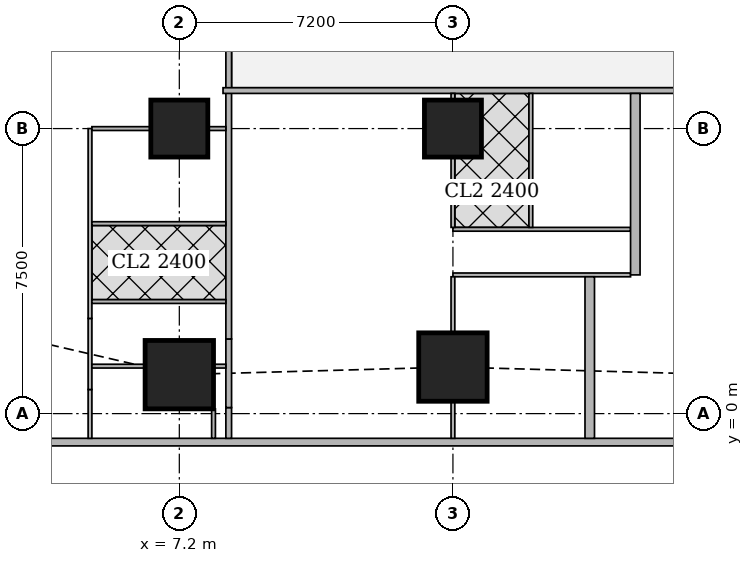
"""IFC4 building model, lengths in metres.
Left out: names, types, materials, properties, quantities, classifications, styles, units other than length and angle.
Written with IfcOpenShell. Run it as: python <this file> out.ifc"""

import sys

from ifc_helpers import new_model, si_unit, direction, frame, frame_2d, origin, origin_2d, place, context, subcontext, project, spatial, rectangle, extrude, element, fill, save


model = new_model("IFC4")
c1 = context("Model", 3, precision=1e-05, world=origin(), true_north=direction((0.0, 1.0)))
c2 = subcontext(c1, "Body", "Model", "MODEL_VIEW")
j1 = project(units=[si_unit("LENGTHUNIT", "METRE"), si_unit("PLANEANGLEUNIT", "RADIAN")], contexts=[c1])
p1 = place(None, origin())
s1 = spatial("IfcSite", under=j1, at=p1, CompositionType="ELEMENT")
p2 = place(p1, origin())
s2 = spatial("IfcBuilding", under=s1, at=p2, CompositionType="ELEMENT")
p3 = place(p2, frame((0.0, 0.0, 158.3)))
s3 = spatial("IfcBuildingStorey", under=s2, at=p3, CompositionType="ELEMENT", Elevation=158.3)
for number, where, z_axis, x_axis in (
    (1, (7.2, 1.025, 0.0), (0.0, 0.0, 1.0), (1.0, 0.0, 0.0)),
    (2, (14.4, 1.225, 0.0), (0.0, 0.0, 1.0), (1.0, 0.0, 0.0)),
):
    element("IfcColumn", number, at=place(p3, frame(where, z_axis=z_axis, x_axis=x_axis)), inside=s3, PredefinedType="COLUMN", context=c2, shape_type="SweptSolid", body=[
        extrude(rectangle(XDim=1.8, YDim=1.8, at=origin_2d()), origin(), (0.0, 0.0, 1.0), 3.75),
    ])
for number, where, z_axis, x_axis in (
    (3, (7.2, 7.5, 0.0), (0.0, 0.0, 1.0), (1.0, 0.0, 0.0)),
    (4, (14.4, 7.5, 0.0), (0.0, 0.0, 1.0), (1.0, 0.0, 0.0)),
):
    element("IfcColumn", number, at=place(p3, frame(where, z_axis=z_axis, x_axis=x_axis)), inside=s3, PredefinedType="COLUMN", context=c2, shape_type="SweptSolid", body=[
        extrude(rectangle(XDim=1.5, YDim=1.5, at=origin_2d()), origin(), (0.0, 0.0, 1.0), 3.75),
    ])
p4 = place(p3, frame((2.163, -0.75, 0.0), z_axis=(0.0, 0.0, 1.0), x_axis=(1.0, 0.0, 0.0)))
e5 = element("IfcWall", 5, at=p4, inside=s3, PredefinedType="SOLIDWALL", context=c2, shape_type="SweptSolid", body=[
    extrude(rectangle(XDim=45.628, YDim=0.2, at=frame_2d((22.814, 0.0))), origin(), (0.0, 0.0, 1.0), 3.5),
])
p5 = place(p4, frame((9.537, 0.0, 0.9)))
e6 = element("IfcOpeningElement", 6, at=p5, cuts=e5, PredefinedType="OPENING", context=c2, shape_type="SweptSolid", body=[
    extrude(rectangle(XDim=1.8, YDim=1.5, at=frame_2d((0.9, 0.75))), frame((0.0, 0.11, 0.0), z_axis=(0.0, -1.0, 0.0), x_axis=(1.0, 0.0, 0.0)), (0.0, 0.0, 1.0), 0.22),
])
p6 = place(p4, frame((13.137, 0.0, 0.9)))
e7 = element("IfcOpeningElement", 7, at=p6, cuts=e5, PredefinedType="OPENING", context=c2, shape_type="SweptSolid", body=[
    extrude(rectangle(XDim=1.8, YDim=1.5, at=frame_2d((0.9, 0.75))), frame((0.0, 0.11, 0.0), z_axis=(0.0, -1.0, 0.0), x_axis=(1.0, 0.0, 0.0)), (0.0, 0.0, 1.0), 0.22),
])
p7 = place(p4, frame((16.737, 0.0, 0.9)))
e8 = element("IfcOpeningElement", 8, at=p7, cuts=e5, PredefinedType="OPENING", context=c2, shape_type="SweptSolid", body=[
    extrude(rectangle(XDim=1.8, YDim=1.5, at=frame_2d((0.9, 0.75))), frame((0.0, 0.11, 0.0), z_axis=(0.0, -1.0, 0.0), x_axis=(1.0, 0.0, 0.0)), (0.0, 0.0, 1.0), 0.22),
])
p8 = place(p4, frame((20.337, 0.0, 0.9)))
e9 = element("IfcOpeningElement", 9, at=p8, cuts=e5, PredefinedType="OPENING", context=c2, shape_type="SweptSolid", body=[
    extrude(rectangle(XDim=1.8, YDim=1.5, at=frame_2d((0.9, 0.75))), frame((0.0, 0.11, 0.0), z_axis=(0.0, -1.0, 0.0), x_axis=(1.0, 0.0, 0.0)), (0.0, 0.0, 1.0), 0.22),
])
p9 = place(p4, frame((23.937, 0.0, 0.9)))
e10 = element("IfcOpeningElement", 10, at=p9, cuts=e5, PredefinedType="OPENING", context=c2, shape_type="SweptSolid", body=[
    extrude(rectangle(XDim=1.8, YDim=1.5, at=frame_2d((0.9, 0.75))), frame((0.0, 0.11, 0.0), z_axis=(0.0, -1.0, 0.0), x_axis=(1.0, 0.0, 0.0)), (0.0, 0.0, 1.0), 0.22),
])
p10 = place(p4, frame((27.537, 0.0, 0.9)))
e11 = element("IfcOpeningElement", 11, at=p10, cuts=e5, PredefinedType="OPENING", context=c2, shape_type="SweptSolid", body=[
    extrude(rectangle(XDim=1.8, YDim=1.5, at=frame_2d((0.9, 0.75))), frame((0.0, 0.11, 0.0), z_axis=(0.0, -1.0, 0.0), x_axis=(1.0, 0.0, 0.0)), (0.0, 0.0, 1.0), 0.22),
])
p11 = place(p4, frame((31.137, 0.0, 0.9)))
e12 = element("IfcOpeningElement", 12, at=p11, cuts=e5, PredefinedType="OPENING", context=c2, shape_type="SweptSolid", body=[
    extrude(rectangle(XDim=1.8, YDim=1.5, at=frame_2d((0.9, 0.75))), frame((0.0, 0.11, 0.0), z_axis=(0.0, -1.0, 0.0), x_axis=(1.0, 0.0, 0.0)), (0.0, 0.0, 1.0), 0.22),
])
p12 = place(p4, frame((34.737, 0.0, 0.9)))
e13 = element("IfcOpeningElement", 13, at=p12, cuts=e5, PredefinedType="OPENING", context=c2, shape_type="SweptSolid", body=[
    extrude(rectangle(XDim=1.8, YDim=1.5, at=frame_2d((0.9, 0.75))), frame((0.0, 0.11, 0.0), z_axis=(0.0, -1.0, 0.0), x_axis=(1.0, 0.0, 0.0)), (0.0, 0.0, 1.0), 0.22),
])
p13 = place(p3, frame((8.5, -0.65, 0.0), z_axis=(0.0, 0.0, 1.0), x_axis=(0.0, 1.0, 0.0)))
e14 = element("IfcWall", 14, at=p13, inside=s3, PredefinedType="SOLIDWALL", context=c2, shape_type="SweptSolid", body=[
    extrude(rectangle(XDim=0.809, YDim=0.15, at=frame_2d((0.404, 0.0))), origin(), (0.0, 0.0, 1.0), 3.5),
])
p14 = place(p3, frame((8.5, 0.159, 0.0), z_axis=(0.0, 0.0, 1.0), x_axis=(0.0, 1.0, 0.0)))
e15 = element("IfcWall", 15, at=p14, inside=s3, PredefinedType="SOLIDWALL", context=c2, shape_type="SweptSolid", body=[
    extrude(rectangle(XDim=1.805, YDim=0.15, at=frame_2d((0.903, 0.0))), origin(), (0.0, 0.0, 1.0), 2.1),
])
p15 = place(p3, frame((8.5, 1.964, 0.0), z_axis=(0.0, 0.0, 1.0), x_axis=(0.0, 1.0, 0.0)))
e16 = element("IfcWall", 16, at=p15, inside=s3, PredefinedType="SOLIDWALL", context=c2, shape_type="SweptSolid", body=[
    extrude(rectangle(XDim=41.097, YDim=0.15, at=frame_2d((20.548, 0.0))), origin(), (0.0, 0.0, 1.0), 3.5),
])
p16 = place(p15, frame((6.911, 0.0, 0.0)))
e17 = element("IfcOpeningElement", 17, at=p16, cuts=e16, PredefinedType="OPENING", context=c2, shape_type="SweptSolid", body=[
    extrude(rectangle(XDim=1.0, YDim=2.1, at=frame_2d((0.5, 1.05))), frame((0.0, 0.085, 0.0), z_axis=(0.0, -1.0, 0.0), x_axis=(1.0, 0.0, 0.0)), (0.0, 0.0, 1.0), 0.17),
])
p17 = place(p15, frame((10.661, 0.0, 0.0)))
e18 = element("IfcOpeningElement", 18, at=p17, cuts=e16, PredefinedType="OPENING", context=c2, shape_type="SweptSolid", body=[
    extrude(rectangle(XDim=1.0, YDim=2.1, at=frame_2d((0.5, 1.05))), frame((0.0, 0.085, 0.0), z_axis=(0.0, -1.0, 0.0), x_axis=(1.0, 0.0, 0.0)), (0.0, 0.0, 1.0), 0.17),
])
p18 = place(p15, frame((25.661, 0.0, 0.0)))
e19 = element("IfcOpeningElement", 19, at=p18, cuts=e16, PredefinedType="OPENING", context=c2, shape_type="SweptSolid", body=[
    extrude(rectangle(XDim=1.0, YDim=2.1, at=frame_2d((0.5, 1.05))), frame((0.0, 0.085, 0.0), z_axis=(0.0, -1.0, 0.0), x_axis=(1.0, 0.0, 0.0)), (0.0, 0.0, 1.0), 0.17),
])
p19 = place(p3, frame((40.053, 8.5, 0.0), z_axis=(0.0, 0.0, 1.0), x_axis=(-1.0, 0.0, 0.0)))
e20 = element("IfcWall", 20, at=p19, inside=s3, PredefinedType="SOLIDWALL", context=c2, shape_type="SweptSolid", body=[
    extrude(rectangle(XDim=31.703, YDim=0.15, at=frame_2d((15.852, 0.0))), origin(), (0.0, 0.0, 1.0), 3.5),
])
p20 = place(p19, frame((28.103, 0.0, 0.0)))
e21 = element("IfcOpeningElement", 21, at=p20, cuts=e20, PredefinedType="OPENING", context=c2, shape_type="SweptSolid", body=[
    extrude(rectangle(XDim=1.0, YDim=2.1, at=frame_2d((0.5, 1.05))), frame((0.0, 0.085, 0.0), z_axis=(0.0, -1.0, 0.0), x_axis=(1.0, 0.0, 0.0)), (0.0, 0.0, 1.0), 0.17),
])
p21 = place(p19, frame((19.754, 0.0, 0.0)))
e22 = element("IfcOpeningElement", 22, at=p21, cuts=e20, PredefinedType="OPENING", context=c2, shape_type="SweptSolid", body=[
    extrude(rectangle(XDim=1.0, YDim=2.1, at=frame_2d((0.5, 1.05))), frame((0.0, 0.085, 0.0), z_axis=(0.0, -1.0, 0.0), x_axis=(1.0, 0.0, 0.0)), (0.0, 0.0, 1.0), 0.17),
])
p22 = place(p19, frame((5.354, 0.0, 0.0)))
e23 = element("IfcOpeningElement", 23, at=p22, cuts=e20, PredefinedType="OPENING", context=c2, shape_type="SweptSolid", body=[
    extrude(rectangle(XDim=1.0, YDim=2.1, at=frame_2d((0.5, 1.05))), frame((0.0, 0.085, 0.0), z_axis=(0.0, -1.0, 0.0), x_axis=(1.0, 0.0, 0.0)), (0.0, 0.0, 1.0), 0.17),
])
p23 = place(p3, frame((8.1, 0.124, 0.0), z_axis=(0.0, 0.0, 1.0), x_axis=(0.0, -1.0, 0.0)))
e24 = element("IfcWall", 24, at=p23, inside=s3, PredefinedType="PARTITIONING", context=c2, shape_type="SweptSolid", body=[
    extrude(rectangle(XDim=0.774, YDim=0.1, at=frame_2d((0.387, 0.0))), origin(), (0.0, 0.0, 1.0), 3.5),
])
p24 = place(p3, frame((4.85, -0.65, 0.0), z_axis=(0.0, 0.0, 1.0), x_axis=(0.0, 1.0, 0.0)))
e25 = element("IfcWall", 25, at=p24, inside=s3, PredefinedType="PARTITIONING", context=c2, shape_type="SweptSolid", body=[
    extrude(rectangle(XDim=1.284, YDim=0.1, at=frame_2d((0.642, 0.0))), origin(), (0.0, 0.0, 1.0), 3.5),
])
p25 = place(p24, frame((0.234, 0.0, 0.0)))
e26 = element("IfcOpeningElement", 26, at=p25, cuts=e25, PredefinedType="OPENING", context=c2, shape_type="SweptSolid", body=[
    extrude(rectangle(XDim=0.9, YDim=2.1, at=frame_2d((0.45, 1.05))), frame((0.0, 0.06, 0.0), z_axis=(0.0, -1.0, 0.0), x_axis=(1.0, 0.0, 0.0)), (0.0, 0.0, 1.0), 0.12),
])
p26 = place(p3, frame((4.85, 0.634, 0.0), z_axis=(0.0, 0.0, 1.0), x_axis=(0.0, 1.0, 0.0)))
e27 = element("IfcWall", 27, at=p26, inside=s3, PredefinedType="PARTITIONING", context=c2, shape_type="SweptSolid", body=[
    extrude(rectangle(XDim=1.871, YDim=0.1, at=frame_2d((0.936, 0.0))), origin(), (0.0, 0.0, 1.0), 2.1),
])
p27 = place(p3, frame((4.85, 2.505, 0.0), z_axis=(0.0, 0.0, 1.0), x_axis=(0.0, 1.0, 0.0)))
e28 = element("IfcWall", 28, at=p27, inside=s3, PredefinedType="PARTITIONING", context=c2, shape_type="SweptSolid", body=[
    extrude(rectangle(XDim=4.995, YDim=0.1, at=frame_2d((2.498, 0.0))), origin(), (0.0, 0.0, 1.0), 3.5),
])
p28 = place(p27, frame((3.294, 0.0, 0.0)))
e29 = element("IfcOpeningElement", 29, at=p28, cuts=e28, PredefinedType="OPENING", context=c2, shape_type="SweptSolid", body=[
    extrude(rectangle(XDim=0.9, YDim=2.1, at=frame_2d((0.45, 1.05))), frame((0.0, 0.06, 0.0), z_axis=(0.0, -1.0, 0.0), x_axis=(1.0, 0.0, 0.0)), (0.0, 0.0, 1.0), 0.12),
])
p29 = place(p27, frame((1.019, 0.0, 0.0)))
e30 = element("IfcOpeningElement", 30, at=p29, cuts=e28, PredefinedType="OPENING", context=c2, shape_type="SweptSolid", body=[
    extrude(rectangle(XDim=0.9, YDim=2.1, at=frame_2d((0.45, 1.05))), frame((0.0, 0.06, 0.0), z_axis=(0.0, -1.0, 0.0), x_axis=(1.0, 0.0, 0.0)), (0.0, 0.0, 1.0), 0.12),
])
p30 = place(p3, frame((4.9, 4.999, 0.0), z_axis=(0.0, 0.0, 1.0), x_axis=(1.0, 0.0, 0.0)))
e31 = element("IfcWall", 31, at=p30, inside=s3, PredefinedType="PARTITIONING", context=c2, shape_type="SweptSolid", body=[
    extrude(rectangle(XDim=3.525, YDim=0.1, at=frame_2d((1.763, 0.0))), origin(), (0.0, 0.0, 1.0), 3.5),
])
p31 = place(p3, frame((4.9, 7.5, 0.0), z_axis=(0.0, 0.0, 1.0), x_axis=(1.0, 0.0, 0.0)))
e32 = element("IfcWall", 32, at=p31, inside=s3, PredefinedType="PARTITIONING", context=c2, shape_type="SweptSolid", body=[
    extrude(rectangle(XDim=1.549, YDim=0.1, at=frame_2d((0.774, 0.0))), origin(), (0.0, 0.0, 1.0), 3.5),
])
p32 = place(p3, frame((7.951, 7.5, 0.0), z_axis=(0.0, 0.0, 1.0), x_axis=(1.0, 0.0, 0.0)))
e33 = element("IfcWall", 33, at=p32, inside=s3, PredefinedType="PARTITIONING", context=c2, shape_type="SweptSolid", body=[
    extrude(rectangle(XDim=0.474, YDim=0.1, at=frame_2d((0.237, 0.0))), origin(), (0.0, 0.0, 1.0), 3.5),
])
p33 = place(p3, frame((4.9, 1.249, 0.0), z_axis=(0.0, 0.0, 1.0), x_axis=(1.0, 0.0, 0.0)))
e34 = element("IfcWall", 34, at=p33, inside=s3, PredefinedType="PARTITIONING", context=c2, shape_type="SweptSolid", body=[
    extrude(rectangle(XDim=1.399, YDim=0.1, at=frame_2d((0.7, 0.0))), origin(), (0.0, 0.0, 1.0), 2.1),
])
p34 = place(p3, frame((8.101, 1.249, 0.0), z_axis=(0.0, 0.0, 1.0), x_axis=(1.0, 0.0, 0.0)))
e35 = element("IfcWall", 35, at=p34, inside=s3, PredefinedType="PARTITIONING", context=c2, shape_type="SweptSolid", body=[
    extrude(rectangle(XDim=0.324, YDim=0.1, at=frame_2d((0.162, 0.0))), origin(), (0.0, 0.0, 1.0), 2.1),
])
p35 = place(p3, frame((4.9, 2.949, 0.0), z_axis=(0.0, 0.0, 1.0), x_axis=(1.0, 0.0, 0.0)))
e36 = element("IfcWall", 36, at=p35, inside=s3, PredefinedType="PARTITIONING", context=c2, shape_type="SweptSolid", body=[
    extrude(rectangle(XDim=3.525, YDim=0.1, at=frame_2d((1.763, 0.0))), origin(), (0.0, 0.0, 1.0), 3.5),
])
p36 = place(p35, frame((0.45, 0.0, 0.0)))
e37 = element("IfcOpeningElement", 37, at=p36, cuts=e36, PredefinedType="OPENING", context=c2, shape_type="SweptSolid", body=[
    extrude(rectangle(XDim=0.9, YDim=2.1, at=frame_2d((0.45, 1.05))), frame((0.0, 0.06, 0.0), z_axis=(0.0, -1.0, 0.0), x_axis=(1.0, 0.0, 0.0)), (0.0, 0.0, 1.0), 0.12),
])
p37 = place(p3, frame((19.074, 3.65, 0.0), z_axis=(0.0, 0.0, 1.0), x_axis=(-1.0, 0.0, 0.0)))
e38 = element("IfcWall", 38, at=p37, inside=s3, PredefinedType="PARTITIONING", context=c2, shape_type="SweptSolid", body=[
    extrude(rectangle(XDim=4.674, YDim=0.1, at=frame_2d((2.337, 0.0))), origin(), (0.0, 0.0, 1.0), 3.5),
])
p38 = place(p37, frame((3.574, 0.0, 0.0)))
e39 = element("IfcOpeningElement", 39, at=p38, cuts=e38, PredefinedType="OPENING", context=c2, shape_type="SweptSolid", body=[
    extrude(rectangle(XDim=0.9, YDim=2.1, at=frame_2d((0.45, 1.05))), frame((0.0, 0.06, 0.0), z_axis=(0.0, -1.0, 0.0), x_axis=(1.0, 0.0, 0.0)), (0.0, 0.0, 1.0), 0.12),
])
p39 = place(p3, frame((19.074, 4.85, 0.0), z_axis=(0.0, 0.0, 1.0), x_axis=(-1.0, 0.0, 0.0)))
e40 = element("IfcWall", 40, at=p39, inside=s3, PredefinedType="PARTITIONING", context=c2, shape_type="SweptSolid", body=[
    extrude(rectangle(XDim=4.674, YDim=0.1, at=frame_2d((2.337, 0.0))), origin(), (0.0, 0.0, 1.0), 3.5),
])
p40 = place(p39, frame((3.199, 0.0, 0.0)))
e41 = element("IfcOpeningElement", 41, at=p40, cuts=e40, PredefinedType="OPENING", context=c2, shape_type="SweptSolid", body=[
    extrude(rectangle(XDim=0.9, YDim=2.1, at=frame_2d((0.45, 1.05))), frame((0.0, 0.06, 0.0), z_axis=(0.0, -1.0, 0.0), x_axis=(1.0, 0.0, 0.0)), (0.0, 0.0, 1.0), 0.12),
])
p41 = place(p39, frame((0.799, 0.0, 0.0)))
e42 = element("IfcOpeningElement", 42, at=p41, cuts=e40, PredefinedType="OPENING", context=c2, shape_type="SweptSolid", body=[
    extrude(rectangle(XDim=0.9, YDim=2.1, at=frame_2d((0.45, 1.05))), frame((0.0, 0.06, 0.0), z_axis=(0.0, -1.0, 0.0), x_axis=(1.0, 0.0, 0.0)), (0.0, 0.0, 1.0), 0.12),
])
p42 = place(p3, frame((14.4, -0.65, 0.0), z_axis=(0.0, 0.0, 1.0), x_axis=(0.0, 1.0, 0.0)))
e43 = element("IfcWall", 43, at=p42, inside=s3, PredefinedType="PARTITIONING", context=c2, shape_type="SweptSolid", body=[
    extrude(rectangle(XDim=0.974, YDim=0.1, at=frame_2d((0.487, 0.0))), origin(), (0.0, 0.0, 1.0), 3.5),
])
p43 = place(p3, frame((14.4, 2.126, 0.0), z_axis=(0.0, 0.0, 1.0), x_axis=(0.0, 1.0, 0.0)))
e44 = element("IfcWall", 44, at=p43, inside=s3, PredefinedType="PARTITIONING", context=c2, shape_type="SweptSolid", body=[
    extrude(rectangle(XDim=1.474, YDim=0.1, at=frame_2d((0.737, 0.0))), origin(), (0.0, 0.0, 1.0), 3.5),
])
p44 = place(p3, frame((14.4, 4.9, 0.0), z_axis=(0.0, 0.0, 1.0), x_axis=(0.0, 1.0, 0.0)))
e45 = element("IfcWall", 45, at=p44, inside=s3, PredefinedType="PARTITIONING", context=c2, shape_type="SweptSolid", body=[
    extrude(rectangle(XDim=1.849, YDim=0.1, at=frame_2d((0.925, 0.0))), origin(), (0.0, 0.0, 1.0), 3.5),
])
p45 = place(p3, frame((14.4, 8.251, 0.0), z_axis=(0.0, 0.0, 1.0), x_axis=(0.0, 1.0, 0.0)))
e46 = element("IfcWall", 46, at=p45, inside=s3, PredefinedType="PARTITIONING", context=c2, shape_type="SweptSolid", body=[
    extrude(rectangle(XDim=0.174, YDim=0.1, at=frame_2d((0.087, 0.0))), origin(), (0.0, 0.0, 1.0), 3.5),
])
p46 = place(p3, frame((16.45, 4.9, 0.0), z_axis=(0.0, 0.0, 1.0), x_axis=(0.0, 1.0, 0.0)))
e47 = element("IfcWall", 47, at=p46, inside=s3, PredefinedType="PARTITIONING", context=c2, shape_type="SweptSolid", body=[
    extrude(rectangle(XDim=3.525, YDim=0.1, at=frame_2d((1.763, 0.0))), origin(), (0.0, 0.0, 1.0), 3.5),
])
p47 = place(p3, frame((18.0, -0.65, 0.0), z_axis=(0.0, 0.0, 1.0), x_axis=(0.0, 1.0, 0.0)))
e48 = element("IfcWall", 48, at=p47, inside=s3, PredefinedType="SOLIDWALL", context=c2, shape_type="SweptSolid", body=[
    extrude(rectangle(XDim=4.25, YDim=0.25, at=frame_2d((2.125, 0.0))), origin(), (0.0, 0.0, 1.0), 2.1),
])
p48 = place(p3, frame((19.199, 3.65, 0.0), z_axis=(0.0, 0.0, 1.0), x_axis=(0.0, 1.0, 0.0)))
e49 = element("IfcWall", 49, at=p48, inside=s3, PredefinedType="SOLIDWALL", context=c2, shape_type="SweptSolid", body=[
    extrude(rectangle(XDim=4.775, YDim=0.25, at=frame_2d((2.388, 0.0))), origin(), (0.0, 0.0, 1.0), 3.5),
])
p49 = place(p5, origin())
e50 = element("IfcWindow", 50, at=p49, inside=s3, PartitioningType="SINGLE_PANEL", PredefinedType="WINDOW", context=c2, shape_type="SweptSolid", body=[
    extrude(rectangle(XDim=1.8, YDim=1.5, at=frame_2d((0.9, 0.75))), frame((0.0, 0.03, 0.0), z_axis=(0.0, -1.0, 0.0), x_axis=(1.0, 0.0, 0.0)), (0.0, 0.0, 1.0), 0.06),
])
fill(e6, e50)
p50 = place(p6, origin())
e51 = element("IfcWindow", 51, at=p50, inside=s3, PartitioningType="SINGLE_PANEL", PredefinedType="WINDOW", context=c2, shape_type="SweptSolid", body=[
    extrude(rectangle(XDim=1.8, YDim=1.5, at=frame_2d((0.9, 0.75))), frame((0.0, 0.03, 0.0), z_axis=(0.0, -1.0, 0.0), x_axis=(1.0, 0.0, 0.0)), (0.0, 0.0, 1.0), 0.06),
])
fill(e7, e51)
p51 = place(p7, origin())
e52 = element("IfcWindow", 52, at=p51, inside=s3, PartitioningType="SINGLE_PANEL", PredefinedType="WINDOW", context=c2, shape_type="SweptSolid", body=[
    extrude(rectangle(XDim=1.8, YDim=1.5, at=frame_2d((0.9, 0.75))), frame((0.0, 0.03, 0.0), z_axis=(0.0, -1.0, 0.0), x_axis=(1.0, 0.0, 0.0)), (0.0, 0.0, 1.0), 0.06),
])
fill(e8, e52)
p52 = place(p28, origin())
e53 = element("IfcDoor", 53, at=p52, inside=s3, OperationType="SINGLE_SWING_LEFT", PredefinedType="DOOR", context=c2, shape_type="SweptSolid", body=[
    extrude(rectangle(XDim=0.9, YDim=2.1, at=frame_2d((0.45, 1.05))), frame((0.0, 0.025, 0.0), z_axis=(0.0, -1.0, 0.0), x_axis=(1.0, 0.0, 0.0)), (0.0, 0.0, 1.0), 0.05),
])
fill(e29, e53)
p53 = place(p29, origin())
e54 = element("IfcDoor", 54, at=p53, inside=s3, OperationType="SINGLE_SWING_LEFT", PredefinedType="DOOR", context=c2, shape_type="SweptSolid", body=[
    extrude(rectangle(XDim=0.9, YDim=2.1, at=frame_2d((0.45, 1.05))), frame((0.0, 0.025, 0.0), z_axis=(0.0, -1.0, 0.0), x_axis=(1.0, 0.0, 0.0)), (0.0, 0.0, 1.0), 0.05),
])
fill(e30, e54)
p54 = place(p25, origin())
e55 = element("IfcDoor", 55, at=p54, inside=s3, OperationType="SINGLE_SWING_LEFT", PredefinedType="DOOR", context=c2, shape_type="SweptSolid", body=[
    extrude(rectangle(XDim=0.9, YDim=2.1, at=frame_2d((0.45, 1.05))), frame((0.0, 0.025, 0.0), z_axis=(0.0, -1.0, 0.0), x_axis=(1.0, 0.0, 0.0)), (0.0, 0.0, 1.0), 0.05),
])
fill(e26, e55)
p55 = place(p36, origin())
e56 = element("IfcDoor", 56, at=p55, inside=s3, OperationType="SINGLE_SWING_RIGHT", PredefinedType="DOOR", context=c2, shape_type="SweptSolid", body=[
    extrude(rectangle(XDim=0.9, YDim=2.1, at=frame_2d((0.45, 1.05))), frame((0.0, 0.025, 0.0), z_axis=(0.0, -1.0, 0.0), x_axis=(1.0, 0.0, 0.0)), (0.0, 0.0, 1.0), 0.05),
])
fill(e37, e56)
p56 = place(p16, origin())
e57 = element("IfcDoor", 57, at=p56, inside=s3, OperationType="SINGLE_SWING_RIGHT", PredefinedType="DOOR", context=c2, shape_type="SweptSolid", body=[
    extrude(rectangle(XDim=1.0, YDim=2.1, at=frame_2d((0.5, 1.05))), frame((0.0, 0.025, 0.0), z_axis=(0.0, -1.0, 0.0), x_axis=(1.0, 0.0, 0.0)), (0.0, 0.0, 1.0), 0.05),
])
fill(e17, e57)
p57 = place(p38, origin())
e58 = element("IfcDoor", 58, at=p57, inside=s3, OperationType="SINGLE_SWING_RIGHT", PredefinedType="DOOR", context=c2, shape_type="SweptSolid", body=[
    extrude(rectangle(XDim=0.9, YDim=2.1, at=frame_2d((0.45, 1.05))), frame((0.0, 0.025, 0.0), z_axis=(0.0, -1.0, 0.0), x_axis=(1.0, 0.0, 0.0)), (0.0, 0.0, 1.0), 0.05),
])
fill(e39, e58)
p58 = place(p40, origin())
e59 = element("IfcDoor", 59, at=p58, inside=s3, OperationType="SINGLE_SWING_LEFT", PredefinedType="DOOR", context=c2, shape_type="SweptSolid", body=[
    extrude(rectangle(XDim=0.9, YDim=2.1, at=frame_2d((0.45, 1.05))), frame((0.0, 0.025, 0.0), z_axis=(0.0, -1.0, 0.0), x_axis=(1.0, 0.0, 0.0)), (0.0, 0.0, 1.0), 0.05),
])
fill(e41, e59)
p59 = place(p41, origin())
e60 = element("IfcDoor", 60, at=p59, inside=s3, OperationType="SINGLE_SWING_RIGHT", PredefinedType="DOOR", context=c2, shape_type="SweptSolid", body=[
    extrude(rectangle(XDim=0.9, YDim=2.1, at=frame_2d((0.45, 1.05))), frame((0.0, 0.025, 0.0), z_axis=(0.0, -1.0, 0.0), x_axis=(1.0, 0.0, 0.0)), (0.0, 0.0, 1.0), 0.05),
])
fill(e42, e60)
p60 = place(p20, origin())
e61 = element("IfcDoor", 61, at=p60, inside=s3, OperationType="SINGLE_SWING_RIGHT", PredefinedType="DOOR", context=c2, shape_type="SweptSolid", body=[
    extrude(rectangle(XDim=1.0, YDim=2.1, at=frame_2d((0.5, 1.05))), frame((0.0, 0.025, 0.0), z_axis=(0.0, -1.0, 0.0), x_axis=(1.0, 0.0, 0.0)), (0.0, 0.0, 1.0), 0.05),
])
fill(e21, e61)
p61 = place(p21, origin())
e62 = element("IfcDoor", 62, at=p61, inside=s3, OperationType="SINGLE_SWING_RIGHT", PredefinedType="DOOR", context=c2, shape_type="SweptSolid", body=[
    extrude(rectangle(XDim=1.0, YDim=2.1, at=frame_2d((0.5, 1.05))), frame((0.0, 0.025, 0.0), z_axis=(0.0, -1.0, 0.0), x_axis=(1.0, 0.0, 0.0)), (0.0, 0.0, 1.0), 0.05),
])
fill(e22, e62)
save(model, sys.argv[1])
